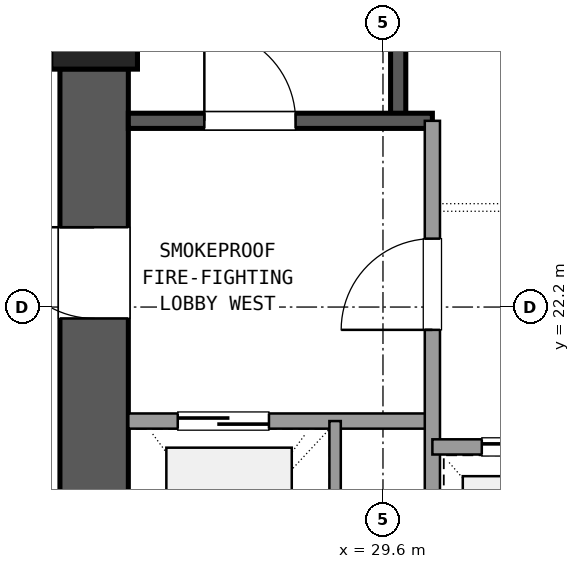
"""IFC4 building model, lengths in metres.
Left out: names, types, materials, properties, quantities, classifications, styles, units other than length and angle.
Written with IfcOpenShell. Run it as: python <this file> out.ifc"""

import sys

from ifc_helpers import new_model, si_unit, direction, frame, frame_2d, origin, origin_2d, place, context, subcontext, project, spatial, rectangle, extrude, element, fill, save


model = new_model("IFC4")
c1 = context("Model", 3, precision=1e-05, world=origin(), true_north=direction((0.0, 1.0)))
c2 = subcontext(c1, "Body", "Model", "MODEL_VIEW")
j1 = project(units=[si_unit("LENGTHUNIT", "METRE"), si_unit("PLANEANGLEUNIT", "RADIAN")], contexts=[c1])
p1 = place(None, origin())
s1 = spatial("IfcSite", under=j1, at=p1, CompositionType="ELEMENT")
p2 = place(p1, origin())
s2 = spatial("IfcBuilding", under=s1, at=p2, CompositionType="ELEMENT")
p3 = place(p2, frame((0.0, 0.0, 49.14)))
s3 = spatial("IfcBuildingStorey", under=s2, at=p3, CompositionType="ELEMENT", Elevation=49.14)
p4 = place(p3, frame((25.8, 25.9, 0.0), z_axis=(0.0, 0.0, 1.0), x_axis=(1.0, 0.0, 0.0)))
e1 = element("IfcColumn", 1, at=p4, inside=s3, PredefinedType="COLUMN", context=c2, shape_type="SweptSolid", body=[
    extrude(rectangle(XDim=1.14, YDim=1.14, at=origin_2d()), origin(), (0.0, 0.0, 1.0), 3.6),
])
p5 = place(p3, frame((25.8, 25.335, 0.0), z_axis=(0.0, 0.0, 1.0), x_axis=(0.0, -1.0, 0.0)))
e2 = element("IfcWall", 2, at=p5, inside=s3, PredefinedType="SHEAR", context=c2, shape_type="SweptSolid", body=[
    extrude(rectangle(XDim=7.47, YDim=0.9, at=frame_2d((3.735, 0.0))), origin(), (0.0, 0.0, 1.0), 3.32),
])
p6 = place(p5, frame((2.085, 0.0, 0.0)))
e3 = element("IfcOpeningElement", 3, at=p6, cuts=e2, PredefinedType="OPENING", context=c2, shape_type="SweptSolid", body=[
    extrude(rectangle(XDim=1.2, YDim=2.15, at=frame_2d((0.6, 1.075))), frame((0.0, 0.46, 0.0), z_axis=(0.0, -1.0, 0.0), x_axis=(1.0, 0.0, 0.0)), (0.0, 0.0, 1.0), 0.92),
])
p7 = place(p3, frame((29.8, 24.65, 0.0), z_axis=(0.0, 0.0, 1.0), x_axis=(0.0, 1.0, 0.0)))
e4 = element("IfcWall", 4, at=p7, inside=s3, PredefinedType="SHEAR", context=c2, shape_type="SweptSolid", body=[
    extrude(rectangle(XDim=9.4, YDim=0.2, at=frame_2d((4.7, 0.0))), origin(), (0.0, 0.0, 1.0), 3.32),
])
p8 = place(p3, frame((26.25, 24.65, 0.0), z_axis=(0.0, 0.0, 1.0), x_axis=(1.0, 0.0, 0.0)))
e5 = element("IfcWall", 5, at=p8, inside=s3, PredefinedType="SHEAR", context=c2, shape_type="SweptSolid", body=[
    extrude(rectangle(XDim=4.0, YDim=0.2, at=frame_2d((2.0, 0.0))), origin(), (0.0, 0.0, 1.0), 3.32),
])
p9 = place(p8, frame((1.0, 0.0, 0.0)))
e6 = element("IfcOpeningElement", 6, at=p9, cuts=e5, PredefinedType="OPENING", context=c2, shape_type="SweptSolid", body=[
    extrude(rectangle(XDim=1.2, YDim=2.15, at=frame_2d((0.6, 1.075))), frame((0.0, 0.11, 0.0), z_axis=(0.0, -1.0, 0.0), x_axis=(1.0, 0.0, 0.0)), (0.0, 0.0, 1.0), 0.22),
])
p10 = place(p3, frame((26.25, 20.7, 0.0), z_axis=(0.0, 0.0, 1.0), x_axis=(1.0, 0.0, 0.0)))
e7 = element("IfcWall", 7, at=p10, inside=s3, PredefinedType="SOLIDWALL", context=c2, shape_type="SweptSolid", body=[
    extrude(rectangle(XDim=4.0, YDim=0.2, at=frame_2d((2.0, 0.0))), origin(), (0.0, 0.0, 1.0), 2.61),
])
p11 = place(p10, frame((0.65, 0.0, 0.0)))
e8 = element("IfcOpeningElement", 8, at=p11, cuts=e7, PredefinedType="OPENING", context=c2, shape_type="SweptSolid", body=[
    extrude(rectangle(XDim=1.2, YDim=2.15, at=frame_2d((0.6, 1.075))), frame((0.0, 0.11, 0.0), z_axis=(0.0, -1.0, 0.0), x_axis=(1.0, 0.0, 0.0)), (0.0, 0.0, 1.0), 0.22),
])
p12 = place(p3, frame((30.25, 17.75, 0.0), z_axis=(0.0, 0.0, 1.0), x_axis=(0.0, 1.0, 0.0)))
e9 = element("IfcWall", 9, at=p12, inside=s3, PredefinedType="SOLIDWALL", context=c2, shape_type="SweptSolid", body=[
    extrude(rectangle(XDim=6.9, YDim=0.2, at=frame_2d((3.45, 0.0))), origin(), (0.0, 0.0, 1.0), 2.61),
])
p13 = place(p12, frame((4.15, 0.0, 0.0)))
e10 = element("IfcOpeningElement", 10, at=p13, cuts=e9, PredefinedType="OPENING", context=c2, shape_type="SweptSolid", body=[
    extrude(rectangle(XDim=1.2, YDim=2.15, at=frame_2d((0.6, 1.075))), frame((0.0, 0.11, 0.0), z_axis=(0.0, -1.0, 0.0), x_axis=(1.0, 0.0, 0.0)), (0.0, 0.0, 1.0), 0.22),
])
p14 = place(p3, frame((28.97, 17.75, 0.0), z_axis=(0.0, 0.0, 1.0), x_axis=(0.0, 1.0, 0.0)))
e11 = element("IfcWall", 11, at=p14, inside=s3, PredefinedType="PARTITIONING", context=c2, shape_type="SweptSolid", body=[
    extrude(rectangle(XDim=2.95, YDim=0.15, at=frame_2d((1.475, 0.0))), origin(), (0.0, 0.0, 1.0), 2.61),
])
p15 = place(p3, frame((30.25, 20.36, 0.0), z_axis=(0.0, 0.0, 1.0), x_axis=(1.0, 0.0, 0.0)))
e12 = element("IfcWall", 12, at=p15, inside=s3, PredefinedType="SOLIDWALL", context=c2, shape_type="SweptSolid", body=[
    extrude(rectangle(XDim=7.0, YDim=0.2, at=frame_2d((3.5, 0.0))), origin(), (0.0, 0.0, 1.0), 2.61),
])
p16 = place(p15, frame((0.65, 0.0, 0.0)))
e13 = element("IfcOpeningElement", 13, at=p16, cuts=e12, PredefinedType="OPENING", context=c2, shape_type="SweptSolid", body=[
    extrude(rectangle(XDim=1.1, YDim=2.15, at=frame_2d((0.55, 1.075))), frame((0.0, 0.11, 0.0), z_axis=(0.0, -1.0, 0.0), x_axis=(1.0, 0.0, 0.0)), (0.0, 0.0, 1.0), 0.22),
])
p17 = place(p15, frame((2.95, 0.0, 0.0)))
e14 = element("IfcOpeningElement", 14, at=p17, cuts=e12, PredefinedType="OPENING", context=c2, shape_type="SweptSolid", body=[
    extrude(rectangle(XDim=1.1, YDim=2.15, at=frame_2d((0.55, 1.075))), frame((0.0, 0.11, 0.0), z_axis=(0.0, -1.0, 0.0), x_axis=(1.0, 0.0, 0.0)), (0.0, 0.0, 1.0), 0.22),
])
p18 = place(p15, frame((5.25, 0.0, 0.0)))
e15 = element("IfcOpeningElement", 15, at=p18, cuts=e12, PredefinedType="OPENING", context=c2, shape_type="SweptSolid", body=[
    extrude(rectangle(XDim=1.1, YDim=2.15, at=frame_2d((0.55, 1.075))), frame((0.0, 0.11, 0.0), z_axis=(0.0, -1.0, 0.0), x_axis=(1.0, 0.0, 0.0)), (0.0, 0.0, 1.0), 0.22),
])
p19 = place(p9, origin())
e16 = element("IfcDoor", 16, at=p19, inside=s3, OperationType="SINGLE_SWING_LEFT", PredefinedType="DOOR", context=c2, shape_type="SweptSolid", body=[
    extrude(rectangle(XDim=1.2, YDim=2.15, at=frame_2d((0.6, 1.075))), frame((0.0, 0.025, 0.0), z_axis=(0.0, -1.0, 0.0), x_axis=(1.0, 0.0, 0.0)), (0.0, 0.0, 1.0), 0.05),
])
fill(e6, e16)
p20 = place(p11, origin())
e17 = element("IfcDoor", 17, at=p20, inside=s3, OperationType="SLIDING_TO_LEFT", PredefinedType="DOOR", context=c2, shape_type="SweptSolid", body=[
    extrude(rectangle(XDim=1.2, YDim=2.15, at=frame_2d((0.6, 1.075))), frame((0.0, 0.025, 0.0), z_axis=(0.0, -1.0, 0.0), x_axis=(1.0, 0.0, 0.0)), (0.0, 0.0, 1.0), 0.05),
])
fill(e8, e17)
p21 = place(p13, origin())
e18 = element("IfcDoor", 18, at=p21, inside=s3, OperationType="SINGLE_SWING_LEFT", PredefinedType="DOOR", context=c2, shape_type="SweptSolid", body=[
    extrude(rectangle(XDim=1.2, YDim=2.15, at=frame_2d((0.6, 1.075))), frame((0.0, 0.025, 0.0), z_axis=(0.0, -1.0, 0.0), x_axis=(1.0, 0.0, 0.0)), (0.0, 0.0, 1.0), 0.05),
])
fill(e10, e18)
p22 = place(p6, frame((1.2, 0.0, 0.0), z_axis=(0.0, 0.0, 1.0), x_axis=(-1.0, 0.0, 0.0)))
e19 = element("IfcDoor", 19, at=p22, inside=s3, OperationType="SINGLE_SWING_LEFT", PredefinedType="DOOR", context=c2, shape_type="SweptSolid", body=[
    extrude(rectangle(XDim=1.2, YDim=2.15, at=frame_2d((0.6, 1.075))), frame((0.0, 0.025, 0.0), z_axis=(0.0, -1.0, 0.0), x_axis=(1.0, 0.0, 0.0)), (0.0, 0.0, 1.0), 0.05),
])
fill(e3, e19)
p23 = place(p16, origin())
e20 = element("IfcDoor", 20, at=p23, inside=s3, OperationType="SLIDING_TO_LEFT", PredefinedType="DOOR", context=c2, shape_type="SweptSolid", body=[
    extrude(rectangle(XDim=1.1, YDim=2.15, at=frame_2d((0.55, 1.075))), frame((0.0, 0.025, 0.0), z_axis=(0.0, -1.0, 0.0), x_axis=(1.0, 0.0, 0.0)), (0.0, 0.0, 1.0), 0.05),
])
fill(e13, e20)
save(model, sys.argv[1])
